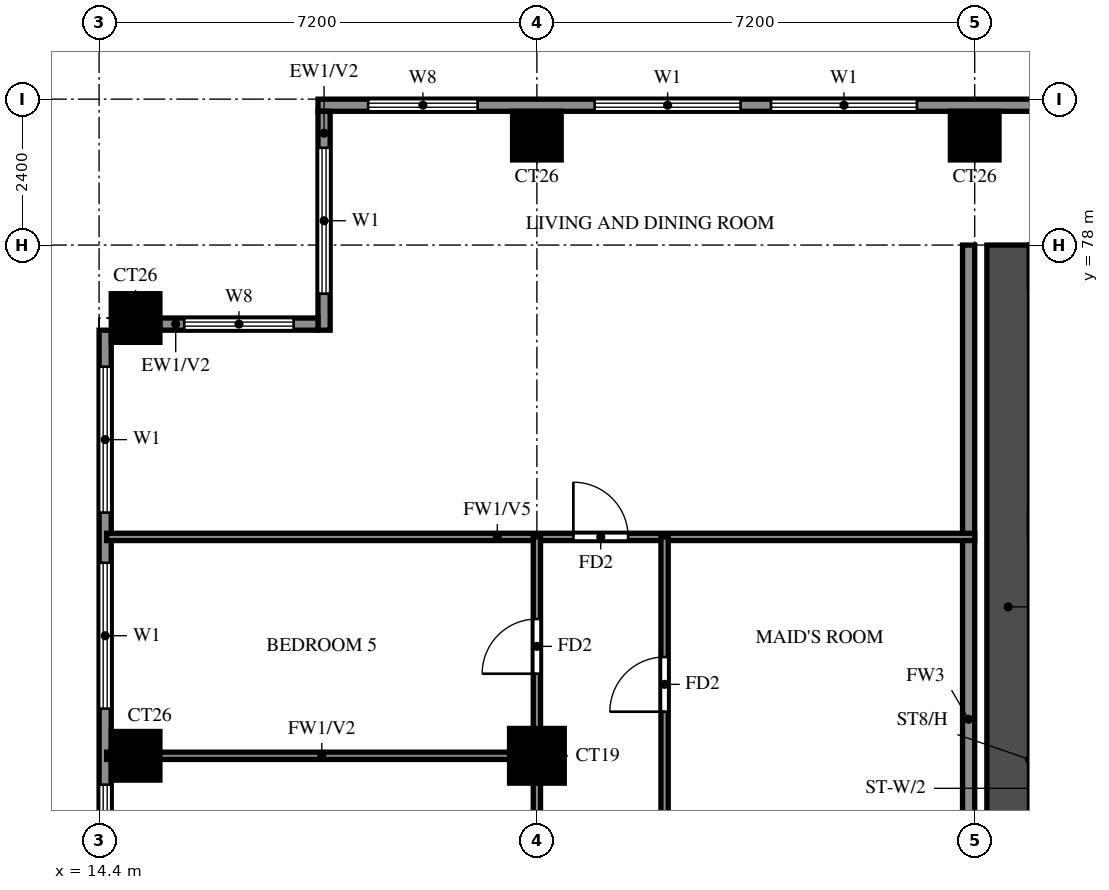
"""IFC4 building model, lengths in metres.
Left out: names, types, materials, properties, quantities, classifications, styles, units other than length and angle.
Written with IfcOpenShell. Run it as: python <this file> out.ifc"""

import sys

from ifc_helpers import new_model, si_unit, direction, frame, frame_2d, origin, origin_2d, place, context, subcontext, project, spatial, rectangle, extrude, source, transform, mapped, element, fill, save


model = new_model("IFC4")
c1 = context("Model", 3, precision=1e-05, world=origin(), true_north=direction((0.0, 1.0)))
c2 = subcontext(c1, "Body", "Model", "MODEL_VIEW")
j1 = project(units=[si_unit("LENGTHUNIT", "METRE"), si_unit("PLANEANGLEUNIT", "RADIAN")], contexts=[c1])
p1 = place(None, origin())
s1 = spatial("IfcSite", under=j1, at=p1, CompositionType="ELEMENT")
p2 = place(p1, origin())
s2 = spatial("IfcBuilding", under=s1, at=p2, CompositionType="ELEMENT")
p3 = place(p2, frame((0.0, 0.0, 192.0)))
s3 = spatial("IfcBuildingStorey", under=s2, at=p3, CompositionType="ELEMENT", Elevation=192.0)
m1 = source(origin(), c2, "Body", "SweptSolid", [
    extrude(rectangle(XDim=0.8, YDim=0.8, at=origin_2d()), origin(), (0.0, 0.0, 1.0), 3.2),
])
p4 = place(p3, frame((15.0, 69.6, 0.0), z_axis=(0.0, 0.0, 1.0), x_axis=(1.0, 0.0, 0.0)))
e1 = element("IfcColumn", 1, at=p4, inside=s3, PredefinedType="COLUMN", context=c2, shape_type="MappedRepresentation", body=[
    mapped(m1, transform((0.0, 0.0, 0.0))),
])
m2 = source(origin(), c2, "Body", "SweptSolid", [
    extrude(rectangle(XDim=0.9, YDim=0.9, at=origin_2d()), origin(), (0.0, 0.0, 1.0), 3.2),
])
p5 = place(p3, frame((21.6, 69.6, 0.0), z_axis=(0.0, 0.0, 1.0), x_axis=(1.0, 0.0, 0.0)))
e2 = element("IfcColumn", 2, at=p5, inside=s3, PredefinedType="COLUMN", context=c2, shape_type="MappedRepresentation", body=[
    mapped(m2, transform((0.0, 0.0, 0.0))),
])
for number, where, z_axis, x_axis in (
    (3, (15.0, 76.8, 0.0), (0.0, 0.0, 1.0), (1.0, 0.0, 0.0)),
    (4, (21.6, 79.8, 0.0), (0.0, 0.0, 1.0), (1.0, 0.0, 0.0)),
    (5, (28.8, 79.8, 0.0), (0.0, 0.0, 1.0), (1.0, 0.0, 0.0)),
):
    element("IfcColumn", number, at=place(p3, frame(where, z_axis=z_axis, x_axis=x_axis)), inside=s3, PredefinedType="COLUMN", context=c2, shape_type="MappedRepresentation", body=[
        mapped(m1, transform((0.0, 0.0, 0.0))),
    ])
p6 = place(p3, frame((29.35, 66.1, 0.0), z_axis=(0.0, 0.0, 1.0), x_axis=(0.0, 1.0, 0.0)))
e6 = element("IfcWall", 6, at=p6, inside=s3, PredefinedType="SHEAR", context=c2, shape_type="SweptSolid", body=[
    extrude(rectangle(XDim=11.9, YDim=0.7, at=frame_2d((5.95, 0.0))), origin(), (0.0, 0.0, 1.0), 3.2),
])
p7 = place(p3, frame((82.6, 80.3, 0.0), z_axis=(0.0, 0.0, 1.0), x_axis=(-1.0, 0.0, 0.0)))
e7 = element("IfcWall", 7, at=p7, inside=s3, PredefinedType="SOLIDWALL", context=c2, shape_type="SweptSolid", body=[
    extrude(rectangle(XDim=64.6, YDim=0.2, at=frame_2d((32.3, 0.0))), origin(), (0.0, 0.0, 1.0), 3.2),
])
p8 = place(p7, frame((4.3, 0.0, 0.0)))
e8 = element("IfcOpeningElement", 8, at=p8, cuts=e7, PredefinedType="OPENING", context=c2, shape_type="SweptSolid", body=[
    extrude(rectangle(XDim=1.8, YDim=2.4, at=frame_2d((0.9, 1.2))), frame((0.0, 0.11, 0.0), z_axis=(0.0, -1.0, 0.0), x_axis=(1.0, 0.0, 0.0)), (0.0, 0.0, 1.0), 0.22),
])
p9 = place(p7, frame((54.75, 0.0, 0.6)))
e9 = element("IfcOpeningElement", 9, at=p9, cuts=e7, PredefinedType="OPENING", context=c2, shape_type="SweptSolid", body=[
    extrude(rectangle(XDim=2.4, YDim=2.4, at=frame_2d((1.2, 1.2))), frame((0.0, 0.11, 0.0), z_axis=(0.0, -1.0, 0.0), x_axis=(1.0, 0.0, 0.0)), (0.0, 0.0, 1.0), 0.22),
])
p10 = place(p7, frame((57.65, 0.0, 0.6)))
e10 = element("IfcOpeningElement", 10, at=p10, cuts=e7, PredefinedType="OPENING", context=c2, shape_type="SweptSolid", body=[
    extrude(rectangle(XDim=2.4, YDim=2.4, at=frame_2d((1.2, 1.2))), frame((0.0, 0.11, 0.0), z_axis=(0.0, -1.0, 0.0), x_axis=(1.0, 0.0, 0.0)), (0.0, 0.0, 1.0), 0.22),
])
p11 = place(p7, frame((61.975, 0.0, 0.6)))
e11 = element("IfcOpeningElement", 11, at=p11, cuts=e7, PredefinedType="OPENING", context=c2, shape_type="SweptSolid", body=[
    extrude(rectangle(XDim=1.8, YDim=2.4, at=frame_2d((0.9, 1.2))), frame((0.0, 0.11, 0.0), z_axis=(0.0, -1.0, 0.0), x_axis=(1.0, 0.0, 0.0)), (0.0, 0.0, 1.0), 0.22),
])
p12 = place(p7, frame((1.725, 0.0, 0.6)))
e12 = element("IfcOpeningElement", 12, at=p12, cuts=e7, PredefinedType="OPENING", context=c2, shape_type="SweptSolid", body=[
    extrude(rectangle(XDim=1.2, YDim=2.4, at=frame_2d((0.6, 1.2))), frame((0.0, 0.11, 0.0), z_axis=(0.0, -1.0, 0.0), x_axis=(1.0, 0.0, 0.0)), (0.0, 0.0, 1.0), 0.22),
])
p13 = place(p7, frame((6.55, 0.0, 0.6)))
e13 = element("IfcOpeningElement", 13, at=p13, cuts=e7, PredefinedType="OPENING", context=c2, shape_type="SweptSolid", body=[
    extrude(rectangle(XDim=0.9, YDim=2.4, at=frame_2d((0.45, 1.2))), frame((0.0, 0.11, 0.0), z_axis=(0.0, -1.0, 0.0), x_axis=(1.0, 0.0, 0.0)), (0.0, 0.0, 1.0), 0.22),
])
p14 = place(p7, frame((8.325, 0.0, 0.6)))
e14 = element("IfcOpeningElement", 14, at=p14, cuts=e7, PredefinedType="OPENING", context=c2, shape_type="SweptSolid", body=[
    extrude(rectangle(XDim=1.8, YDim=2.4, at=frame_2d((0.9, 1.2))), frame((0.0, 0.11, 0.0), z_axis=(0.0, -1.0, 0.0), x_axis=(1.0, 0.0, 0.0)), (0.0, 0.0, 1.0), 0.22),
])
p15 = place(p3, frame((18.1, 80.2, 0.0), z_axis=(0.0, 0.0, 1.0), x_axis=(0.0, -1.0, 0.0)))
e15 = element("IfcWall", 15, at=p15, inside=s3, PredefinedType="SOLIDWALL", context=c2, shape_type="SweptSolid", body=[
    extrude(rectangle(XDim=3.6, YDim=0.2, at=frame_2d((1.8, 0.0))), origin(), (0.0, 0.0, 1.0), 3.2),
])
p16 = place(p15, frame((0.6, 0.0, 0.6)))
e16 = element("IfcOpeningElement", 16, at=p16, cuts=e15, PredefinedType="OPENING", context=c2, shape_type="SweptSolid", body=[
    extrude(rectangle(XDim=2.4, YDim=2.4, at=frame_2d((1.2, 1.2))), frame((0.0, 0.11, 0.0), z_axis=(0.0, -1.0, 0.0), x_axis=(1.0, 0.0, 0.0)), (0.0, 0.0, 1.0), 0.22),
])
p17 = place(p3, frame((18.0, 76.7, 0.0), z_axis=(0.0, 0.0, 1.0), x_axis=(-1.0, 0.0, 0.0)))
e17 = element("IfcWall", 17, at=p17, inside=s3, PredefinedType="SOLIDWALL", context=c2, shape_type="SweptSolid", body=[
    extrude(rectangle(XDim=2.6, YDim=0.2, at=frame_2d((1.3, 0.0))), origin(), (0.0, 0.0, 1.0), 3.2),
])
p18 = place(p17, frame((0.4, 0.0, 0.6)))
e18 = element("IfcOpeningElement", 18, at=p18, cuts=e17, PredefinedType="OPENING", context=c2, shape_type="SweptSolid", body=[
    extrude(rectangle(XDim=1.8, YDim=2.4, at=frame_2d((0.9, 1.2))), frame((0.0, 0.11, 0.0), z_axis=(0.0, -1.0, 0.0), x_axis=(1.0, 0.0, 0.0)), (0.0, 0.0, 1.0), 0.22),
])
p19 = place(p3, frame((14.5, 76.6, 0.0), z_axis=(0.0, 0.0, 1.0), x_axis=(0.0, -1.0, 0.0)))
e19 = element("IfcWall", 19, at=p19, inside=s3, PredefinedType="SOLIDWALL", context=c2, shape_type="SweptSolid", body=[
    extrude(rectangle(XDim=33.4, YDim=0.2, at=frame_2d((16.7, 0.0))), origin(), (0.0, 0.0, 1.0), 3.2),
])
p20 = place(p19, frame((11.5, 0.0, 0.0)))
e20 = element("IfcOpeningElement", 20, at=p20, cuts=e19, PredefinedType="OPENING", context=c2, shape_type="SweptSolid", body=[
    extrude(rectangle(XDim=1.8, YDim=2.4, at=frame_2d((0.9, 1.2))), frame((0.0, 0.11, 0.0), z_axis=(0.0, -1.0, 0.0), x_axis=(1.0, 0.0, 0.0)), (0.0, 0.0, 1.0), 0.22),
])
p21 = place(p19, frame((25.9, 0.0, 0.0)))
e21 = element("IfcOpeningElement", 21, at=p21, cuts=e19, PredefinedType="OPENING", context=c2, shape_type="SweptSolid", body=[
    extrude(rectangle(XDim=1.8, YDim=2.4, at=frame_2d((0.9, 1.2))), frame((0.0, 0.11, 0.0), z_axis=(0.0, -1.0, 0.0), x_axis=(1.0, 0.0, 0.0)), (0.0, 0.0, 1.0), 0.22),
])
p22 = place(p19, frame((29.075, 0.0, 0.6)))
e22 = element("IfcOpeningElement", 22, at=p22, cuts=e19, PredefinedType="OPENING", context=c2, shape_type="SweptSolid", body=[
    extrude(rectangle(XDim=1.2, YDim=2.4, at=frame_2d((0.6, 1.2))), frame((0.0, 0.11, 0.0), z_axis=(0.0, -1.0, 0.0), x_axis=(1.0, 0.0, 0.0)), (0.0, 0.0, 1.0), 0.22),
])
p23 = place(p19, frame((31.2, 0.0, 0.6)))
e23 = element("IfcOpeningElement", 23, at=p23, cuts=e19, PredefinedType="OPENING", context=c2, shape_type="SweptSolid", body=[
    extrude(rectangle(XDim=1.8, YDim=2.4, at=frame_2d((0.9, 1.2))), frame((0.0, 0.11, 0.0), z_axis=(0.0, -1.0, 0.0), x_axis=(1.0, 0.0, 0.0)), (0.0, 0.0, 1.0), 0.22),
])
p24 = place(p19, frame((21.875, 0.0, 0.6)))
e24 = element("IfcOpeningElement", 24, at=p24, cuts=e19, PredefinedType="OPENING", context=c2, shape_type="SweptSolid", body=[
    extrude(rectangle(XDim=1.8, YDim=2.4, at=frame_2d((0.9, 1.2))), frame((0.0, 0.11, 0.0), z_axis=(0.0, -1.0, 0.0), x_axis=(1.0, 0.0, 0.0)), (0.0, 0.0, 1.0), 0.22),
])
p25 = place(p19, frame((18.225, 0.0, 0.6)))
e25 = element("IfcOpeningElement", 25, at=p25, cuts=e19, PredefinedType="OPENING", context=c2, shape_type="SweptSolid", body=[
    extrude(rectangle(XDim=2.4, YDim=2.4, at=frame_2d((1.2, 1.2))), frame((0.0, 0.11, 0.0), z_axis=(0.0, -1.0, 0.0), x_axis=(1.0, 0.0, 0.0)), (0.0, 0.0, 1.0), 0.22),
])
p26 = place(p19, frame((14.675, 0.0, 0.6)))
e26 = element("IfcOpeningElement", 26, at=p26, cuts=e19, PredefinedType="OPENING", context=c2, shape_type="SweptSolid", body=[
    extrude(rectangle(XDim=1.2, YDim=2.4, at=frame_2d((0.6, 1.2))), frame((0.0, 0.11, 0.0), z_axis=(0.0, -1.0, 0.0), x_axis=(1.0, 0.0, 0.0)), (0.0, 0.0, 1.0), 0.22),
])
p27 = place(p19, frame((16.75, 0.0, 0.6)))
e27 = element("IfcOpeningElement", 27, at=p27, cuts=e19, PredefinedType="OPENING", context=c2, shape_type="SweptSolid", body=[
    extrude(rectangle(XDim=0.9, YDim=2.4, at=frame_2d((0.45, 1.2))), frame((0.0, 0.11, 0.0), z_axis=(0.0, -1.0, 0.0), x_axis=(1.0, 0.0, 0.0)), (0.0, 0.0, 1.0), 0.22),
])
p28 = place(p19, frame((7.475, 0.0, 0.6)))
e28 = element("IfcOpeningElement", 28, at=p28, cuts=e19, PredefinedType="OPENING", context=c2, shape_type="SweptSolid", body=[
    extrude(rectangle(XDim=1.8, YDim=2.4, at=frame_2d((0.9, 1.2))), frame((0.0, 0.11, 0.0), z_axis=(0.0, -1.0, 0.0), x_axis=(1.0, 0.0, 0.0)), (0.0, 0.0, 1.0), 0.22),
])
p29 = place(p19, frame((3.825, 0.0, 0.6)))
e29 = element("IfcOpeningElement", 29, at=p29, cuts=e19, PredefinedType="OPENING", context=c2, shape_type="SweptSolid", body=[
    extrude(rectangle(XDim=2.4, YDim=2.4, at=frame_2d((1.2, 1.2))), frame((0.0, 0.11, 0.0), z_axis=(0.0, -1.0, 0.0), x_axis=(1.0, 0.0, 0.0)), (0.0, 0.0, 1.0), 0.22),
])
p30 = place(p19, frame((0.6, 0.0, 0.6)))
e30 = element("IfcOpeningElement", 30, at=p30, cuts=e19, PredefinedType="OPENING", context=c2, shape_type="SweptSolid", body=[
    extrude(rectangle(XDim=2.4, YDim=2.4, at=frame_2d((1.2, 1.2))), frame((0.0, 0.11, 0.0), z_axis=(0.0, -1.0, 0.0), x_axis=(1.0, 0.0, 0.0)), (0.0, 0.0, 1.0), 0.22),
])
p31 = place(p3, frame((28.7, 62.4, 0.0), z_axis=(0.0, 0.0, 1.0), x_axis=(0.0, 1.0, 0.0)))
e31 = element("IfcWall", 31, at=p31, inside=s3, PredefinedType="SOLIDWALL", context=c2, shape_type="SweptSolid", body=[
    extrude(rectangle(XDim=15.6, YDim=0.2, at=frame_2d((7.8, 0.0))), origin(), (0.0, 0.0, 1.0), 3.2),
])
p32 = place(p3, frame((14.525, 69.6, 0.0), z_axis=(0.0, 0.0, 1.0), x_axis=(1.0, 0.0, 0.0)))
e32 = element("IfcWall", 32, at=p32, inside=s3, PredefinedType="PARTITIONING", context=c2, shape_type="SweptSolid", body=[
    extrude(rectangle(XDim=7.075, YDim=0.12, at=frame_2d((3.538, 0.0))), origin(), (0.0, 0.0, 1.0), 3.2),
])
p33 = place(p3, frame((14.525, 73.2, 0.0), z_axis=(0.0, 0.0, 1.0), x_axis=(1.0, 0.0, 0.0)))
e33 = element("IfcWall", 33, at=p33, inside=s3, PredefinedType="PARTITIONING", context=c2, shape_type="SweptSolid", body=[
    extrude(rectangle(XDim=14.275, YDim=0.12, at=frame_2d((7.138, 0.0))), origin(), (0.0, 0.0, 1.0), 2.3),
])
p34 = place(p33, frame((7.675, 0.0, 0.0)))
e34 = element("IfcOpeningElement", 34, at=p34, cuts=e33, PredefinedType="OPENING", context=c2, shape_type="SweptSolid", body=[
    extrude(rectangle(XDim=0.9, YDim=2.1, at=frame_2d((0.45, 1.05))), frame((0.0, 0.07, 0.0), z_axis=(0.0, -1.0, 0.0), x_axis=(1.0, 0.0, 0.0)), (0.0, 0.0, 1.0), 0.14),
])
p35 = place(p3, frame((21.6, 48.0, 0.0), z_axis=(0.0, 0.0, 1.0), x_axis=(0.0, 1.0, 0.0)))
e35 = element("IfcWall", 35, at=p35, inside=s3, PredefinedType="PARTITIONING", context=c2, shape_type="SweptSolid", body=[
    extrude(rectangle(XDim=25.2, YDim=0.12, at=frame_2d((12.6, 0.0))), origin(), (0.0, 0.0, 1.0), 3.2),
])
p36 = place(p35, frame((1.35, 0.0, 0.0)))
e36 = element("IfcOpeningElement", 36, at=p36, cuts=e35, PredefinedType="OPENING", context=c2, shape_type="SweptSolid", body=[
    extrude(rectangle(XDim=0.9, YDim=2.1, at=frame_2d((0.45, 1.05))), frame((0.0, 0.07, 0.0), z_axis=(0.0, -1.0, 0.0), x_axis=(1.0, 0.0, 0.0)), (0.0, 0.0, 1.0), 0.14),
])
p37 = place(p35, frame((4.95, 0.0, 0.0)))
e37 = element("IfcOpeningElement", 37, at=p37, cuts=e35, PredefinedType="OPENING", context=c2, shape_type="SweptSolid", body=[
    extrude(rectangle(XDim=0.9, YDim=2.1, at=frame_2d((0.45, 1.05))), frame((0.0, 0.07, 0.0), z_axis=(0.0, -1.0, 0.0), x_axis=(1.0, 0.0, 0.0)), (0.0, 0.0, 1.0), 0.14),
])
p38 = place(p35, frame((8.25, 0.0, 0.0)))
e38 = element("IfcOpeningElement", 38, at=p38, cuts=e35, PredefinedType="OPENING", context=c2, shape_type="SweptSolid", body=[
    extrude(rectangle(XDim=1.5, YDim=2.1, at=frame_2d((0.75, 1.05))), frame((0.0, 0.07, 0.0), z_axis=(0.0, -1.0, 0.0), x_axis=(1.0, 0.0, 0.0)), (0.0, 0.0, 1.0), 0.14),
])
p39 = place(p35, frame((12.15, 0.0, 0.0)))
e39 = element("IfcOpeningElement", 39, at=p39, cuts=e35, PredefinedType="OPENING", context=c2, shape_type="SweptSolid", body=[
    extrude(rectangle(XDim=0.9, YDim=2.1, at=frame_2d((0.45, 1.05))), frame((0.0, 0.07, 0.0), z_axis=(0.0, -1.0, 0.0), x_axis=(1.0, 0.0, 0.0)), (0.0, 0.0, 1.0), 0.14),
])
p40 = place(p35, frame((15.75, 0.0, 0.0)))
e40 = element("IfcOpeningElement", 40, at=p40, cuts=e35, PredefinedType="OPENING", context=c2, shape_type="SweptSolid", body=[
    extrude(rectangle(XDim=0.9, YDim=2.1, at=frame_2d((0.45, 1.05))), frame((0.0, 0.07, 0.0), z_axis=(0.0, -1.0, 0.0), x_axis=(1.0, 0.0, 0.0)), (0.0, 0.0, 1.0), 0.14),
])
p41 = place(p35, frame((19.35, 0.0, 0.0)))
e41 = element("IfcOpeningElement", 41, at=p41, cuts=e35, PredefinedType="OPENING", context=c2, shape_type="SweptSolid", body=[
    extrude(rectangle(XDim=0.9, YDim=2.1, at=frame_2d((0.45, 1.05))), frame((0.0, 0.07, 0.0), z_axis=(0.0, -1.0, 0.0), x_axis=(1.0, 0.0, 0.0)), (0.0, 0.0, 1.0), 0.14),
])
p42 = place(p35, frame((22.95, 0.0, 0.0)))
e42 = element("IfcOpeningElement", 42, at=p42, cuts=e35, PredefinedType="OPENING", context=c2, shape_type="SweptSolid", body=[
    extrude(rectangle(XDim=0.9, YDim=2.1, at=frame_2d((0.45, 1.05))), frame((0.0, 0.07, 0.0), z_axis=(0.0, -1.0, 0.0), x_axis=(1.0, 0.0, 0.0)), (0.0, 0.0, 1.0), 0.14),
])
p43 = place(p3, frame((23.7, 61.2, 0.0), z_axis=(0.0, 0.0, 1.0), x_axis=(0.0, 1.0, 0.0)))
e43 = element("IfcWall", 43, at=p43, inside=s3, PredefinedType="PARTITIONING", context=c2, shape_type="SweptSolid", body=[
    extrude(rectangle(XDim=12.0, YDim=0.12, at=frame_2d((6.0, 0.0))), origin(), (0.0, 0.0, 1.0), 3.2),
])
p44 = place(p43, frame((5.5, 0.0, 0.0)))
e44 = element("IfcOpeningElement", 44, at=p44, cuts=e43, PredefinedType="OPENING", context=c2, shape_type="SweptSolid", body=[
    extrude(rectangle(XDim=0.8, YDim=2.1, at=frame_2d((0.4, 1.05))), frame((0.0, 0.07, 0.0), z_axis=(0.0, -1.0, 0.0), x_axis=(1.0, 0.0, 0.0)), (0.0, 0.0, 1.0), 0.14),
])
p45 = place(p43, frame((9.125, 0.0, 0.0)))
e45 = element("IfcOpeningElement", 45, at=p45, cuts=e43, PredefinedType="OPENING", context=c2, shape_type="SweptSolid", body=[
    extrude(rectangle(XDim=0.9, YDim=2.1, at=frame_2d((0.45, 1.05))), frame((0.0, 0.07, 0.0), z_axis=(0.0, -1.0, 0.0), x_axis=(1.0, 0.0, 0.0)), (0.0, 0.0, 1.0), 0.14),
])
p46 = place(p9, origin())
e46 = element("IfcWindow", 46, at=p46, inside=s3, PartitioningType="DOUBLE_PANEL_VERTICAL", PredefinedType="WINDOW", context=c2, shape_type="SweptSolid", body=[
    extrude(rectangle(XDim=2.4, YDim=2.4, at=frame_2d((1.2, 1.2))), frame((0.0, 0.03, 0.0), z_axis=(0.0, -1.0, 0.0), x_axis=(1.0, 0.0, 0.0)), (0.0, 0.0, 1.0), 0.06),
])
fill(e9, e46)
p47 = place(p10, origin())
e47 = element("IfcWindow", 47, at=p47, inside=s3, PartitioningType="DOUBLE_PANEL_VERTICAL", PredefinedType="WINDOW", context=c2, shape_type="SweptSolid", body=[
    extrude(rectangle(XDim=2.4, YDim=2.4, at=frame_2d((1.2, 1.2))), frame((0.0, 0.03, 0.0), z_axis=(0.0, -1.0, 0.0), x_axis=(1.0, 0.0, 0.0)), (0.0, 0.0, 1.0), 0.06),
])
fill(e10, e47)
p48 = place(p11, origin())
e48 = element("IfcWindow", 48, at=p48, inside=s3, PartitioningType="DOUBLE_PANEL_VERTICAL", PredefinedType="WINDOW", context=c2, shape_type="SweptSolid", body=[
    extrude(rectangle(XDim=1.8, YDim=2.4, at=frame_2d((0.9, 1.2))), frame((0.0, 0.03, 0.0), z_axis=(0.0, -1.0, 0.0), x_axis=(1.0, 0.0, 0.0)), (0.0, 0.0, 1.0), 0.06),
])
fill(e11, e48)
p49 = place(p16, origin())
e49 = element("IfcWindow", 49, at=p49, inside=s3, PartitioningType="DOUBLE_PANEL_VERTICAL", PredefinedType="WINDOW", context=c2, shape_type="SweptSolid", body=[
    extrude(rectangle(XDim=2.4, YDim=2.4, at=frame_2d((1.2, 1.2))), frame((0.0, 0.03, 0.0), z_axis=(0.0, -1.0, 0.0), x_axis=(1.0, 0.0, 0.0)), (0.0, 0.0, 1.0), 0.06),
])
fill(e16, e49)
p50 = place(p18, origin())
e50 = element("IfcWindow", 50, at=p50, inside=s3, PartitioningType="DOUBLE_PANEL_VERTICAL", PredefinedType="WINDOW", context=c2, shape_type="SweptSolid", body=[
    extrude(rectangle(XDim=1.8, YDim=2.4, at=frame_2d((0.9, 1.2))), frame((0.0, 0.03, 0.0), z_axis=(0.0, -1.0, 0.0), x_axis=(1.0, 0.0, 0.0)), (0.0, 0.0, 1.0), 0.06),
])
fill(e18, e50)
p51 = place(p28, origin())
e51 = element("IfcWindow", 51, at=p51, inside=s3, PartitioningType="DOUBLE_PANEL_VERTICAL", PredefinedType="WINDOW", context=c2, shape_type="SweptSolid", body=[
    extrude(rectangle(XDim=1.8, YDim=2.4, at=frame_2d((0.9, 1.2))), frame((0.0, 0.03, 0.0), z_axis=(0.0, -1.0, 0.0), x_axis=(1.0, 0.0, 0.0)), (0.0, 0.0, 1.0), 0.06),
])
fill(e28, e51)
p52 = place(p29, origin())
e52 = element("IfcWindow", 52, at=p52, inside=s3, PartitioningType="DOUBLE_PANEL_VERTICAL", PredefinedType="WINDOW", context=c2, shape_type="SweptSolid", body=[
    extrude(rectangle(XDim=2.4, YDim=2.4, at=frame_2d((1.2, 1.2))), frame((0.0, 0.03, 0.0), z_axis=(0.0, -1.0, 0.0), x_axis=(1.0, 0.0, 0.0)), (0.0, 0.0, 1.0), 0.06),
])
fill(e29, e52)
p53 = place(p30, origin())
e53 = element("IfcWindow", 53, at=p53, inside=s3, PartitioningType="DOUBLE_PANEL_VERTICAL", PredefinedType="WINDOW", context=c2, shape_type="SweptSolid", body=[
    extrude(rectangle(XDim=2.4, YDim=2.4, at=frame_2d((1.2, 1.2))), frame((0.0, 0.03, 0.0), z_axis=(0.0, -1.0, 0.0), x_axis=(1.0, 0.0, 0.0)), (0.0, 0.0, 1.0), 0.06),
])
fill(e30, e53)
p54 = place(p42, origin())
e54 = element("IfcDoor", 54, at=p54, inside=s3, OperationType="SINGLE_SWING_LEFT", PredefinedType="DOOR", context=c2, shape_type="SweptSolid", body=[
    extrude(rectangle(XDim=0.9, YDim=2.1, at=frame_2d((0.45, 1.05))), frame((0.0, 0.025, 0.0), z_axis=(0.0, -1.0, 0.0), x_axis=(1.0, 0.0, 0.0)), (0.0, 0.0, 1.0), 0.05),
])
fill(e42, e54)
p55 = place(p34, origin())
e55 = element("IfcDoor", 55, at=p55, inside=s3, OperationType="SINGLE_SWING_LEFT", PredefinedType="DOOR", context=c2, shape_type="SweptSolid", body=[
    extrude(rectangle(XDim=0.9, YDim=2.1, at=frame_2d((0.45, 1.05))), frame((0.0, 0.025, 0.0), z_axis=(0.0, -1.0, 0.0), x_axis=(1.0, 0.0, 0.0)), (0.0, 0.0, 1.0), 0.05),
])
fill(e34, e55)
p56 = place(p45, origin())
e56 = element("IfcDoor", 56, at=p56, inside=s3, OperationType="SINGLE_SWING_LEFT", PredefinedType="DOOR", context=c2, shape_type="SweptSolid", body=[
    extrude(rectangle(XDim=0.9, YDim=2.1, at=frame_2d((0.45, 1.05))), frame((0.0, 0.025, 0.0), z_axis=(0.0, -1.0, 0.0), x_axis=(1.0, 0.0, 0.0)), (0.0, 0.0, 1.0), 0.05),
])
fill(e45, e56)
save(model, sys.argv[1])
